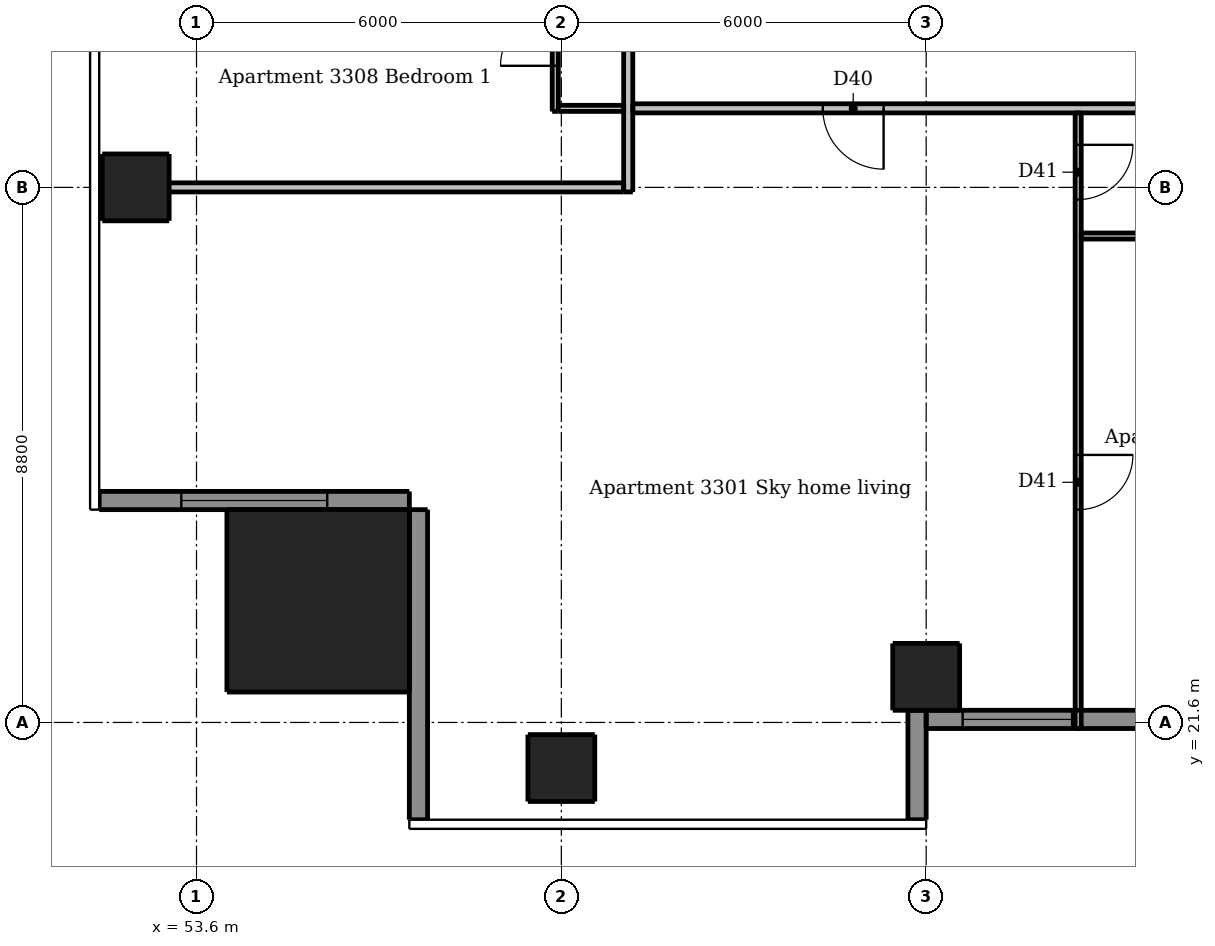
"""IFC4 building model, lengths in metres.
Left out: names, types, materials, properties, quantities, classifications, styles, units other than length and angle.
Written with IfcOpenShell. Run it as: python <this file> out.ifc"""

import sys

from ifc_helpers import new_model, si_unit, direction, frame, frame_2d, origin, origin_2d, place, context, subcontext, project, spatial, rectangle, extrude, element, fill, save


model = new_model("IFC4")
c1 = context("Model", 3, precision=1e-05, world=origin(), true_north=direction((0.0, 1.0)))
c2 = subcontext(c1, "Body", "Model", "MODEL_VIEW")
j1 = project(units=[si_unit("LENGTHUNIT", "METRE"), si_unit("PLANEANGLEUNIT", "RADIAN")], contexts=[c1])
p1 = place(None, origin())
s1 = spatial("IfcSite", under=j1, at=p1, CompositionType="ELEMENT")
p2 = place(p1, origin())
s2 = spatial("IfcBuilding", under=s1, at=p2, CompositionType="ELEMENT")
p3 = place(p2, frame((0.0, 0.0, 121.6)))
s3 = spatial("IfcBuildingStorey", under=s2, at=p3, CompositionType="ELEMENT", Elevation=121.6)
for number, where, z_axis, x_axis in (
    (1, (59.6, 20.85, 0.0), (0.0, 0.0, 1.0), (1.0, 0.0, 0.0)),
    (2, (65.6, 22.35, 0.0), (0.0, 0.0, 1.0), (1.0, 0.0, 0.0)),
    (3, (52.6, 30.4, 0.0), (0.0, 0.0, 1.0), (1.0, 0.0, 0.0)),
):
    element("IfcColumn", number, at=place(p3, frame(where, z_axis=z_axis, x_axis=x_axis)), inside=s3, PredefinedType="COLUMN", context=c2, shape_type="SweptSolid", body=[
        extrude(rectangle(XDim=1.1, YDim=1.1, at=origin_2d()), origin(), (0.0, 0.0, 1.0), 2.95),
    ])
p4 = place(p3, frame((55.6, 23.6, 0.0), z_axis=(0.0, 0.0, 1.0), x_axis=(1.0, 0.0, 0.0)))
e4 = element("IfcColumn", 4, at=p4, inside=s3, PredefinedType="COLUMN", context=c2, shape_type="SweptSolid", body=[
    extrude(rectangle(XDim=3.0, YDim=3.0, at=origin_2d()), origin(), (0.0, 0.0, 1.0), 3.3),
])
p5 = place(p3, frame((65.45, 20.0, 0.0), z_axis=(0.0, 0.0, 1.0), x_axis=(0.0, 1.0, 0.0)))
e5 = element("IfcWall", 5, at=p5, inside=s3, PredefinedType="SOLIDWALL", context=c2, shape_type="SweptSolid", body=[
    extrude(rectangle(XDim=1.8, YDim=0.3, at=frame_2d((0.9, 0.0))), origin(), (0.0, 0.0, 1.0), 2.95),
])
p6 = place(p3, frame((52.0, 25.25, 0.0), z_axis=(0.0, 0.0, 1.0), x_axis=(1.0, 0.0, 0.0)))
e6 = element("IfcWall", 6, at=p6, inside=s3, PredefinedType="SOLIDWALL", context=c2, shape_type="SweptSolid", body=[
    extrude(rectangle(XDim=5.1, YDim=0.3, at=frame_2d((2.55, 0.0))), origin(), (0.0, 0.0, 1.0), 2.95),
])
p7 = place(p6, frame((1.35, 0.0, 0.15)))
e7 = element("IfcOpeningElement", 7, at=p7, cuts=e6, PredefinedType="OPENING", context=c2, shape_type="SweptSolid", body=[
    extrude(rectangle(XDim=2.4, YDim=2.1, at=frame_2d((1.2, 1.05))), frame((0.0, 0.16, 0.0), z_axis=(0.0, -1.0, 0.0), x_axis=(1.0, 0.0, 0.0)), (0.0, 0.0, 1.0), 0.32),
])
p8 = place(p3, frame((57.25, 25.1, 0.0), z_axis=(0.0, 0.0, 1.0), x_axis=(0.0, -1.0, 0.0)))
e8 = element("IfcWall", 8, at=p8, inside=s3, PredefinedType="SOLIDWALL", context=c2, shape_type="SweptSolid", body=[
    extrude(rectangle(XDim=5.1, YDim=0.3, at=frame_2d((2.55, 0.0))), origin(), (0.0, 0.0, 1.0), 2.95),
])
p9 = place(p3, frame((65.6, 21.65, 0.0), z_axis=(0.0, 0.0, 1.0), x_axis=(1.0, 0.0, 0.0)))
e9 = element("IfcWall", 9, at=p9, inside=s3, PredefinedType="SOLIDWALL", context=c2, shape_type="SweptSolid", body=[
    extrude(rectangle(XDim=5.7, YDim=0.3, at=frame_2d((2.85, 0.0))), origin(), (0.0, 0.0, 1.0), 2.34),
])
p10 = place(p9, frame((0.6, 0.0, 0.15)))
e10 = element("IfcOpeningElement", 10, at=p10, cuts=e9, PredefinedType="OPENING", context=c2, shape_type="SweptSolid", body=[
    extrude(rectangle(XDim=1.8, YDim=2.1, at=frame_2d((0.9, 1.05))), frame((0.0, 0.16, 0.0), z_axis=(0.0, -1.0, 0.0), x_axis=(1.0, 0.0, 0.0)), (0.0, 0.0, 1.0), 0.32),
])
p11 = place(p9, frame((3.6, 0.0, 0.15)))
e11 = element("IfcOpeningElement", 11, at=p11, cuts=e9, PredefinedType="OPENING", context=c2, shape_type="SweptSolid", body=[
    extrude(rectangle(XDim=1.8, YDim=2.1, at=frame_2d((0.9, 1.05))), frame((0.0, 0.16, 0.0), z_axis=(0.0, -1.0, 0.0), x_axis=(1.0, 0.0, 0.0)), (0.0, 0.0, 1.0), 0.32),
])
p12 = place(p3, frame((59.5, 31.65, 0.0), z_axis=(0.0, 0.0, 1.0), x_axis=(0.0, 1.0, 0.0)))
e12 = element("IfcWall", 12, at=p12, inside=s3, PredefinedType="PARTITIONING", context=c2, shape_type="SweptSolid", body=[
    extrude(rectangle(XDim=16.675, YDim=0.1, at=frame_2d((8.337, 0.0))), origin(), (0.0, 0.0, 1.0), 2.332),
])
p13 = place(p12, frame((9.7, 0.0, 0.0)))
e13 = element("IfcOpeningElement", 13, at=p13, cuts=e12, PredefinedType="OPENING", context=c2, shape_type="SweptSolid", body=[
    extrude(rectangle(XDim=0.9, YDim=2.1, at=frame_2d((0.45, 1.05))), frame((0.0, 0.06, 0.0), z_axis=(0.0, -1.0, 0.0), x_axis=(1.0, 0.0, 0.0)), (0.0, 0.0, 1.0), 0.12),
])
p14 = place(p12, frame((14.8, 0.0, 0.0)))
e14 = element("IfcOpeningElement", 14, at=p14, cuts=e12, PredefinedType="OPENING", context=c2, shape_type="SweptSolid", body=[
    extrude(rectangle(XDim=0.9, YDim=2.1, at=frame_2d((0.45, 1.05))), frame((0.0, 0.06, 0.0), z_axis=(0.0, -1.0, 0.0), x_axis=(1.0, 0.0, 0.0)), (0.0, 0.0, 1.0), 0.12),
])
p15 = place(p12, frame((12.4, 0.0, 0.0)))
e15 = element("IfcOpeningElement", 15, at=p15, cuts=e12, PredefinedType="OPENING", context=c2, shape_type="SweptSolid", body=[
    extrude(rectangle(XDim=0.9, YDim=2.1, at=frame_2d((0.45, 1.05))), frame((0.0, 0.06, 0.0), z_axis=(0.0, -1.0, 0.0), x_axis=(1.0, 0.0, 0.0)), (0.0, 0.0, 1.0), 0.12),
])
p16 = place(p12, frame((5.2, 0.0, 0.0)))
e16 = element("IfcOpeningElement", 16, at=p16, cuts=e12, PredefinedType="OPENING", context=c2, shape_type="SweptSolid", body=[
    extrude(rectangle(XDim=0.9, YDim=2.1, at=frame_2d((0.45, 1.05))), frame((0.0, 0.06, 0.0), z_axis=(0.0, -1.0, 0.0), x_axis=(1.0, 0.0, 0.0)), (0.0, 0.0, 1.0), 0.12),
])
p17 = place(p12, frame((7.05, 0.0, 0.0)))
e17 = element("IfcOpeningElement", 17, at=p17, cuts=e12, PredefinedType="OPENING", context=c2, shape_type="SweptSolid", body=[
    extrude(rectangle(XDim=0.8, YDim=2.1, at=frame_2d((0.4, 1.05))), frame((0.0, 0.06, 0.0), z_axis=(0.0, -1.0, 0.0), x_axis=(1.0, 0.0, 0.0)), (0.0, 0.0, 1.0), 0.12),
])
p18 = place(p12, frame((0.75, 0.0, 0.0)))
e18 = element("IfcOpeningElement", 18, at=p18, cuts=e12, PredefinedType="OPENING", context=c2, shape_type="SweptSolid", body=[
    extrude(rectangle(XDim=0.9, YDim=2.1, at=frame_2d((0.45, 1.05))), frame((0.0, 0.06, 0.0), z_axis=(0.0, -1.0, 0.0), x_axis=(1.0, 0.0, 0.0)), (0.0, 0.0, 1.0), 0.12),
])
p19 = place(p12, frame((3.15, 0.0, 0.0)))
e19 = element("IfcOpeningElement", 19, at=p19, cuts=e12, PredefinedType="OPENING", context=c2, shape_type="SweptSolid", body=[
    extrude(rectangle(XDim=0.8, YDim=2.1, at=frame_2d((0.4, 1.05))), frame((0.0, 0.06, 0.0), z_axis=(0.0, -1.0, 0.0), x_axis=(1.0, 0.0, 0.0)), (0.0, 0.0, 1.0), 0.12),
])
p20 = place(p3, frame((68.1, 31.625, 0.0), z_axis=(0.0, 0.0, 1.0), x_axis=(0.0, -1.0, 0.0)))
e20 = element("IfcWall", 20, at=p20, inside=s3, PredefinedType="PARTITIONING", context=c2, shape_type="SweptSolid", body=[
    extrude(rectangle(XDim=10.125, YDim=0.1, at=frame_2d((5.062, 0.0))), origin(), (0.0, 0.0, 1.0), 2.95),
])
p21 = place(p20, frame((0.525, 0.0, 0.0)))
e21 = element("IfcOpeningElement", 21, at=p21, cuts=e20, PredefinedType="OPENING", context=c2, shape_type="SweptSolid", body=[
    extrude(rectangle(XDim=0.9, YDim=2.1, at=frame_2d((0.45, 1.05))), frame((0.0, 0.06, 0.0), z_axis=(0.0, -1.0, 0.0), x_axis=(1.0, 0.0, 0.0)), (0.0, 0.0, 1.0), 0.12),
])
p22 = place(p20, frame((5.625, 0.0, 0.0)))
e22 = element("IfcOpeningElement", 22, at=p22, cuts=e20, PredefinedType="OPENING", context=c2, shape_type="SweptSolid", body=[
    extrude(rectangle(XDim=0.9, YDim=2.1, at=frame_2d((0.45, 1.05))), frame((0.0, 0.06, 0.0), z_axis=(0.0, -1.0, 0.0), x_axis=(1.0, 0.0, 0.0)), (0.0, 0.0, 1.0), 0.12),
])
p23 = place(p3, frame((59.55, 31.7, 0.0), z_axis=(0.0, 0.0, 1.0), x_axis=(1.0, 0.0, 0.0)))
e23 = element("IfcWall", 23, at=p23, inside=s3, PredefinedType="PARTITIONING", context=c2, shape_type="SweptSolid", body=[
    extrude(rectangle(XDim=1.075, YDim=0.1, at=frame_2d((0.538, 0.0))), origin(), (0.0, 0.0, 1.0), 2.95),
])
p24 = place(p3, frame((68.15, 29.6, 0.0), z_axis=(0.0, 0.0, 1.0), x_axis=(1.0, 0.0, 0.0)))
e24 = element("IfcWall", 24, at=p24, inside=s3, PredefinedType="PARTITIONING", context=c2, shape_type="SweptSolid", body=[
    extrude(rectangle(XDim=6.475, YDim=0.1, at=frame_2d((3.238, 0.0))), origin(), (0.0, 0.0, 1.0), 2.95),
])
p25 = place(p24, frame((4.05, 0.0, 0.0)))
e25 = element("IfcOpeningElement", 25, at=p25, cuts=e24, PredefinedType="OPENING", context=c2, shape_type="SweptSolid", body=[
    extrude(rectangle(XDim=0.8, YDim=2.1, at=frame_2d((0.4, 1.05))), frame((0.0, 0.06, 0.0), z_axis=(0.0, -1.0, 0.0), x_axis=(1.0, 0.0, 0.0)), (0.0, 0.0, 1.0), 0.12),
])
p26 = place(p3, frame((60.7, 30.325, 0.0), z_axis=(0.0, 0.0, 1.0), x_axis=(0.0, 1.0, 0.0)))
e26 = element("IfcWall", 26, at=p26, inside=s3, PredefinedType="PARTITIONING", context=c2, shape_type="SweptSolid", body=[
    extrude(rectangle(XDim=28.9, YDim=0.15, at=frame_2d((14.45, 0.0))), origin(), (0.0, 0.0, 1.0), 2.95),
])
p27 = place(p26, frame((9.225, 0.0, 0.0)))
e27 = element("IfcOpeningElement", 27, at=p27, cuts=e26, PredefinedType="OPENING", context=c2, shape_type="SweptSolid", body=[
    extrude(rectangle(XDim=1.0, YDim=2.1, at=frame_2d((0.5, 1.05))), frame((0.0, 0.085, 0.0), z_axis=(0.0, -1.0, 0.0), x_axis=(1.0, 0.0, 0.0)), (0.0, 0.0, 1.0), 0.17),
])
p28 = place(p26, frame((26.025, 0.0, 0.0)))
e28 = element("IfcOpeningElement", 28, at=p28, cuts=e26, PredefinedType="OPENING", context=c2, shape_type="SweptSolid", body=[
    extrude(rectangle(XDim=1.0, YDim=2.1, at=frame_2d((0.5, 1.05))), frame((0.0, 0.085, 0.0), z_axis=(0.0, -1.0, 0.0), x_axis=(1.0, 0.0, 0.0)), (0.0, 0.0, 1.0), 0.17),
])
p29 = place(p3, frame((89.525, 31.7, 0.0), z_axis=(0.0, 0.0, 1.0), x_axis=(-1.0, 0.0, 0.0)))
e29 = element("IfcWall", 29, at=p29, inside=s3, PredefinedType="PARTITIONING", context=c2, shape_type="SweptSolid", body=[
    extrude(rectangle(XDim=28.75, YDim=0.15, at=frame_2d((14.375, 0.0))), origin(), (0.0, 0.0, 1.0), 2.95),
])
p30 = place(p29, frame((24.625, 0.0, 0.0)))
e30 = element("IfcOpeningElement", 30, at=p30, cuts=e29, PredefinedType="OPENING", context=c2, shape_type="SweptSolid", body=[
    extrude(rectangle(XDim=1.0, YDim=2.1, at=frame_2d((0.5, 1.05))), frame((0.0, 0.085, 0.0), z_axis=(0.0, -1.0, 0.0), x_axis=(1.0, 0.0, 0.0)), (0.0, 0.0, 1.0), 0.17),
])
p31 = place(p29, frame((5.425, 0.0, 0.0)))
e31 = element("IfcOpeningElement", 31, at=p31, cuts=e29, PredefinedType="OPENING", context=c2, shape_type="SweptSolid", body=[
    extrude(rectangle(XDim=1.0, YDim=2.1, at=frame_2d((0.5, 1.05))), frame((0.0, 0.085, 0.0), z_axis=(0.0, -1.0, 0.0), x_axis=(1.0, 0.0, 0.0)), (0.0, 0.0, 1.0), 0.17),
])
p32 = place(p3, frame((52.0, 30.4, 0.0), z_axis=(0.0, 0.0, 1.0), x_axis=(1.0, 0.0, 0.0)))
e32 = element("IfcWall", 32, at=p32, inside=s3, PredefinedType="PARTITIONING", context=c2, shape_type="SweptSolid", body=[
    extrude(rectangle(XDim=8.625, YDim=0.15, at=frame_2d((4.312, 0.0))), origin(), (0.0, 0.0, 1.0), 2.332),
])
p33 = place(p7, origin())
e33 = element("IfcWindow", 33, at=p33, inside=s3, PartitioningType="DOUBLE_PANEL_VERTICAL", PredefinedType="WINDOW", context=c2, shape_type="SweptSolid", body=[
    extrude(rectangle(XDim=2.4, YDim=2.1, at=frame_2d((1.2, 1.05))), frame((0.0, 0.03, 0.0), z_axis=(0.0, -1.0, 0.0), x_axis=(1.0, 0.0, 0.0)), (0.0, 0.0, 1.0), 0.06),
])
fill(e7, e33)
p34 = place(p10, origin())
e34 = element("IfcWindow", 34, at=p34, inside=s3, PartitioningType="DOUBLE_PANEL_VERTICAL", PredefinedType="WINDOW", context=c2, shape_type="SweptSolid", body=[
    extrude(rectangle(XDim=1.8, YDim=2.1, at=frame_2d((0.9, 1.05))), frame((0.0, 0.03, 0.0), z_axis=(0.0, -1.0, 0.0), x_axis=(1.0, 0.0, 0.0)), (0.0, 0.0, 1.0), 0.06),
])
fill(e10, e34)
p35 = place(p30, origin())
e35 = element("IfcDoor", 35, at=p35, inside=s3, OperationType="SINGLE_SWING_LEFT", PredefinedType="DOOR", context=c2, shape_type="SweptSolid", body=[
    extrude(rectangle(XDim=1.0, YDim=2.1, at=frame_2d((0.5, 1.05))), frame((0.0, 0.025, 0.0), z_axis=(0.0, -1.0, 0.0), x_axis=(1.0, 0.0, 0.0)), (0.0, 0.0, 1.0), 0.05),
])
fill(e30, e35)
p36 = place(p21, origin())
e36 = element("IfcDoor", 36, at=p36, inside=s3, OperationType="SINGLE_SWING_LEFT", PredefinedType="DOOR", context=c2, shape_type="SweptSolid", body=[
    extrude(rectangle(XDim=0.9, YDim=2.1, at=frame_2d((0.45, 1.05))), frame((0.0, 0.025, 0.0), z_axis=(0.0, -1.0, 0.0), x_axis=(1.0, 0.0, 0.0)), (0.0, 0.0, 1.0), 0.05),
])
fill(e21, e36)
p37 = place(p22, origin())
e37 = element("IfcDoor", 37, at=p37, inside=s3, OperationType="SINGLE_SWING_LEFT", PredefinedType="DOOR", context=c2, shape_type="SweptSolid", body=[
    extrude(rectangle(XDim=0.9, YDim=2.1, at=frame_2d((0.45, 1.05))), frame((0.0, 0.025, 0.0), z_axis=(0.0, -1.0, 0.0), x_axis=(1.0, 0.0, 0.0)), (0.0, 0.0, 1.0), 0.05),
])
fill(e22, e37)
p38 = place(p18, origin())
e38 = element("IfcDoor", 38, at=p38, inside=s3, OperationType="SINGLE_SWING_LEFT", PredefinedType="DOOR", context=c2, shape_type="SweptSolid", body=[
    extrude(rectangle(XDim=0.9, YDim=2.1, at=frame_2d((0.45, 1.05))), frame((0.0, 0.025, 0.0), z_axis=(0.0, -1.0, 0.0), x_axis=(1.0, 0.0, 0.0)), (0.0, 0.0, 1.0), 0.05),
])
fill(e18, e38)
save(model, sys.argv[1])
